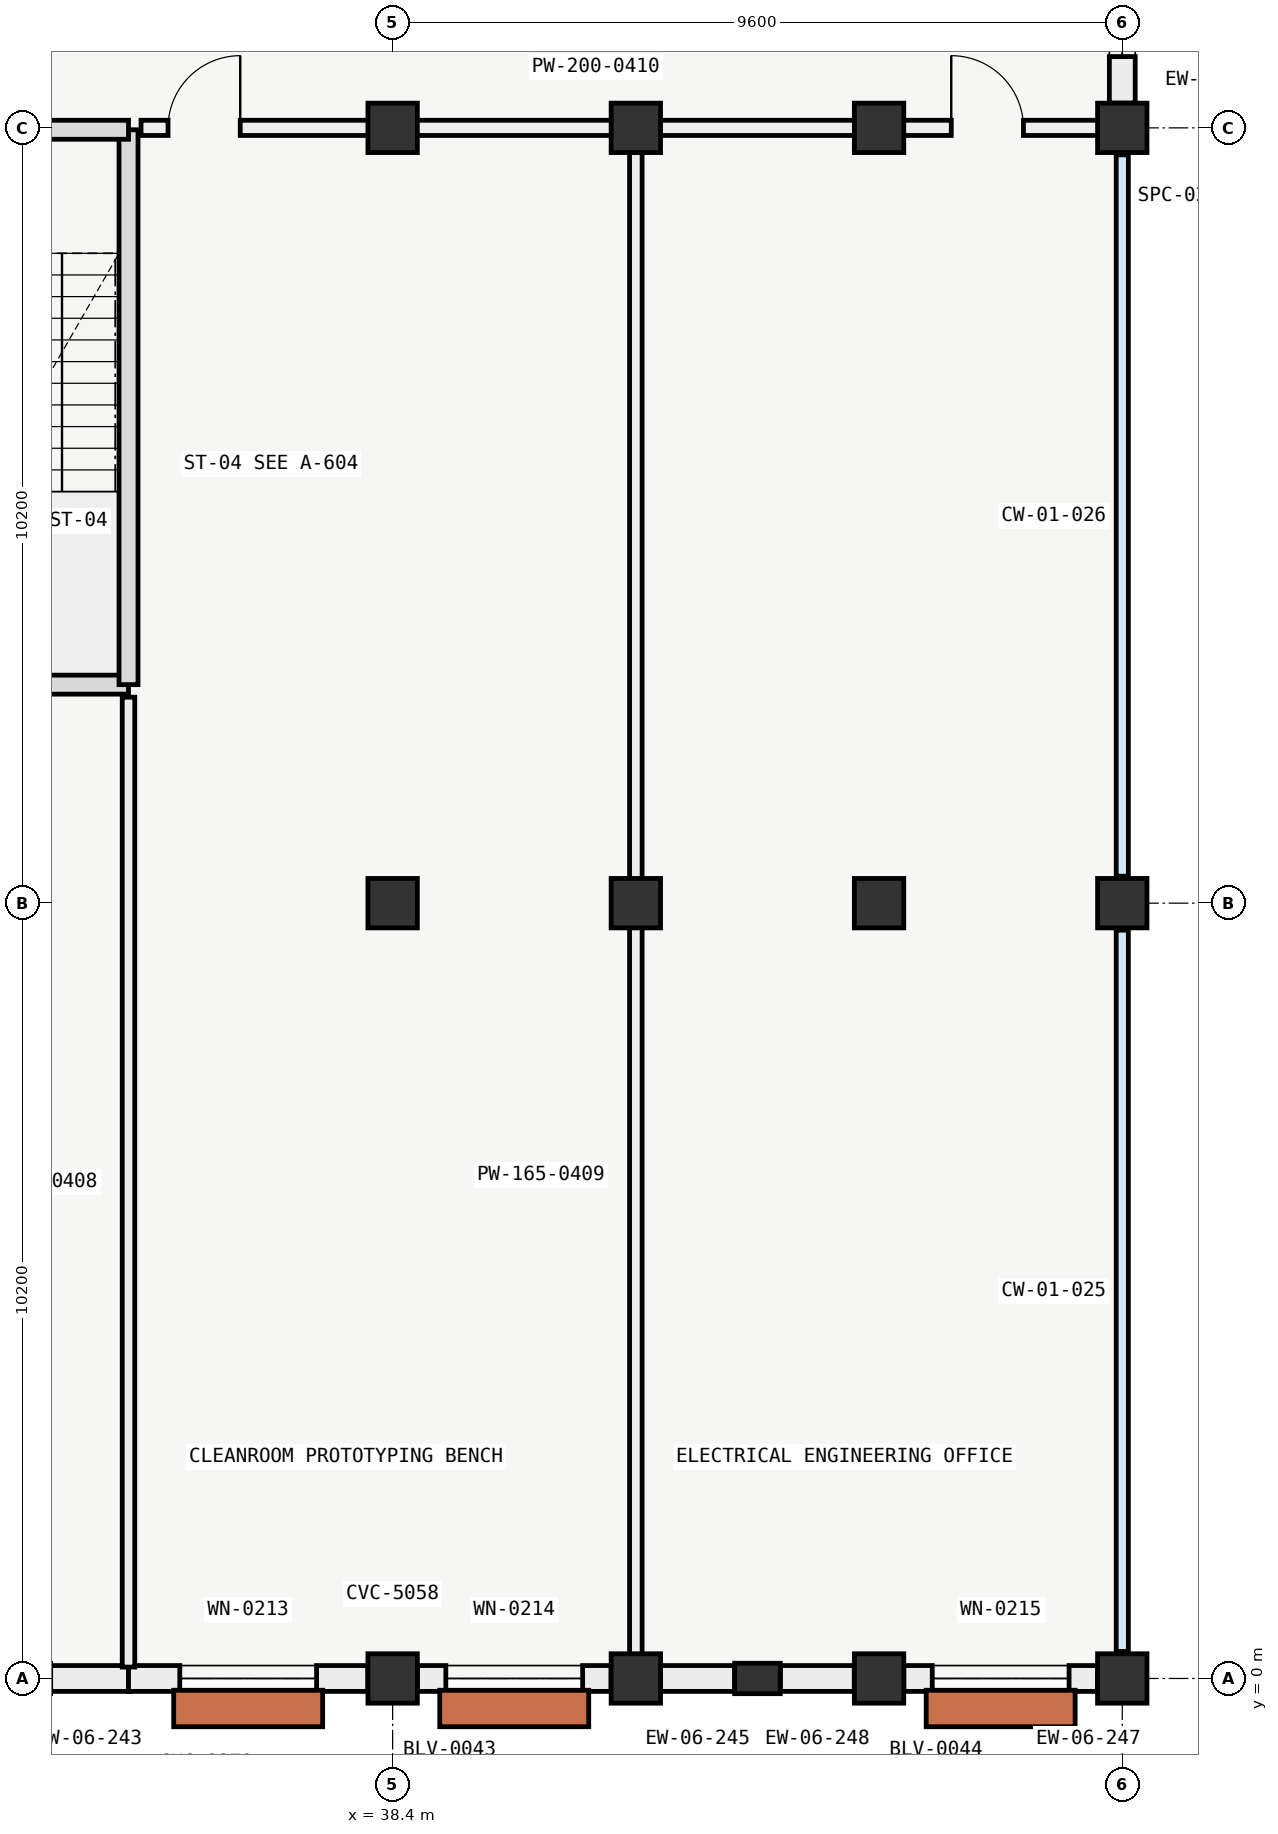
"""IFC4 building model, lengths in metres.
Left out: names, types, materials, properties, quantities, classifications, styles, units other than length and angle.
Written with IfcOpenShell. Run it as: python <this file> out.ifc"""

import sys

from ifc_helpers import new_model, si_unit, direction, frame, frame_2d, origin, origin_2d, place, context, subcontext, project, spatial, rectangle, extrude, element, fill, save


model = new_model("IFC4")
c1 = context("Model", 3, precision=1e-05, world=origin(), true_north=direction((0.0, 1.0)))
c2 = subcontext(c1, "Body", "Model", "MODEL_VIEW")
j1 = project(units=[si_unit("LENGTHUNIT", "METRE"), si_unit("PLANEANGLEUNIT", "RADIAN")], contexts=[c1])
p1 = place(None, origin())
s1 = spatial("IfcSite", under=j1, at=p1, CompositionType="ELEMENT")
p2 = place(p1, origin())
s2 = spatial("IfcBuilding", under=s1, at=p2, CompositionType="ELEMENT")
p3 = place(p2, frame((0.0, 0.0, 13.8)))
s3 = spatial("IfcBuildingStorey", under=s2, at=p3, CompositionType="ELEMENT", Elevation=13.8)
for number, where, z_axis, x_axis in (
    (1, (38.4, 0.0, 0.0), (0.0, 0.0, 1.0), (1.0, 0.0, 0.0)),
    (2, (38.4, 10.2, 0.0), (0.0, 0.0, 1.0), (1.0, 0.0, 0.0)),
    (3, (38.4, 20.4, 0.0), (0.0, 0.0, 1.0), (1.0, 0.0, 0.0)),
    (4, (41.6, 0.0, 0.0), (0.0, 0.0, 1.0), (1.0, 0.0, 0.0)),
    (5, (41.6, 10.2, 0.0), (0.0, 0.0, 1.0), (1.0, 0.0, 0.0)),
    (6, (41.6, 20.4, 0.0), (0.0, 0.0, 1.0), (1.0, 0.0, 0.0)),
    (7, (44.8, 0.0, 0.0), (0.0, 0.0, 1.0), (1.0, 0.0, 0.0)),
    (8, (44.8, 10.2, 0.0), (0.0, 0.0, 1.0), (1.0, 0.0, 0.0)),
    (9, (44.8, 20.4, 0.0), (0.0, 0.0, 1.0), (1.0, 0.0, 0.0)),
    (10, (48.0, 0.0, 0.0), (0.0, 0.0, 1.0), (1.0, 0.0, 0.0)),
    (11, (48.0, 10.2, 0.0), (0.0, 0.0, 1.0), (1.0, 0.0, 0.0)),
    (12, (48.0, 20.4, 0.0), (0.0, 0.0, 1.0), (1.0, 0.0, 0.0)),
):
    element("IfcColumn", number, at=place(p3, frame(where, z_axis=z_axis, x_axis=x_axis)), inside=s3, PredefinedType="COLUMN", context=c2, shape_type="SweptSolid", body=[
        extrude(rectangle(XDim=0.65, YDim=0.65, at=origin_2d()), origin(), (0.0, 0.0, 1.0), 4.2),
    ])
p4 = place(p3, frame((43.2, 0.0, 0.0), z_axis=(0.0, 0.0, 1.0), x_axis=(0.0, 1.0, 0.0)))
e13 = element("IfcColumn", 13, at=p4, inside=s3, PredefinedType="PILASTER", context=c2, shape_type="SweptSolid", body=[
    extrude(rectangle(XDim=0.4, YDim=0.6, at=origin_2d()), origin(), (0.0, 0.0, 1.0), 4.2),
])
p5 = place(p3, frame((34.925, 0.0, 0.0), z_axis=(0.0, 0.0, 1.0), x_axis=(-1.0, 0.0, 0.0)))
e14 = element("IfcWall", 14, at=p5, inside=s3, PredefinedType="SOLIDWALL", context=c2, shape_type="SweptSolid", body=[
    extrude(rectangle(XDim=1.024, YDim=0.34, at=frame_2d((0.512, 0.0))), origin(), (0.0, 0.0, 1.0), 3.28),
])
p6 = place(p3, frame((38.074, 0.0, 0.0), z_axis=(0.0, 0.0, 1.0), x_axis=(-1.0, 0.0, 0.0)))
e15 = element("IfcWall", 15, at=p6, inside=s3, PredefinedType="SOLIDWALL", context=c2, shape_type="SweptSolid", body=[
    extrude(rectangle(XDim=3.149, YDim=0.34, at=frame_2d((1.574, 0.0))), origin(), (0.0, 0.0, 1.0), 3.28),
])
p7 = place(p6, frame((0.675, 0.0, 0.8)))
e16 = element("IfcOpeningElement", 16, at=p7, cuts=e15, PredefinedType="OPENING", context=c2, shape_type="SweptSolid", body=[
    extrude(rectangle(XDim=1.8, YDim=2.1, at=frame_2d((0.9, 1.05))), frame((0.0, 0.18, 0.0), z_axis=(0.0, -1.0, 0.0), x_axis=(1.0, 0.0, 0.0)), (0.0, 0.0, 1.0), 0.36),
])
p8 = place(p3, frame((42.899, 0.0, 0.0), z_axis=(0.0, 0.0, 1.0), x_axis=(-1.0, 0.0, 0.0)))
e17 = element("IfcWall", 17, at=p8, inside=s3, PredefinedType="SOLIDWALL", context=c2, shape_type="SweptSolid", body=[
    extrude(rectangle(XDim=0.973, YDim=0.34, at=frame_2d((0.486, 0.0))), origin(), (0.0, 0.0, 1.0), 3.28),
])
p9 = place(p3, frame((41.274, 0.0, 0.0), z_axis=(0.0, 0.0, 1.0), x_axis=(-1.0, 0.0, 0.0)))
e18 = element("IfcWall", 18, at=p9, inside=s3, PredefinedType="SOLIDWALL", context=c2, shape_type="SweptSolid", body=[
    extrude(rectangle(XDim=2.548, YDim=0.34, at=frame_2d((1.274, 0.0))), origin(), (0.0, 0.0, 1.0), 3.28),
])
p10 = place(p9, frame((0.374, 0.0, 0.8)))
e19 = element("IfcOpeningElement", 19, at=p10, cuts=e18, PredefinedType="OPENING", context=c2, shape_type="SweptSolid", body=[
    extrude(rectangle(XDim=1.8, YDim=2.1, at=frame_2d((0.9, 1.05))), frame((0.0, 0.18, 0.0), z_axis=(0.0, -1.0, 0.0), x_axis=(1.0, 0.0, 0.0)), (0.0, 0.0, 1.0), 0.36),
])
p11 = place(p3, frame((47.674, 0.0, 0.0), z_axis=(0.0, 0.0, 1.0), x_axis=(-1.0, 0.0, 0.0)))
e20 = element("IfcWall", 20, at=p11, inside=s3, PredefinedType="SOLIDWALL", context=c2, shape_type="SweptSolid", body=[
    extrude(rectangle(XDim=2.548, YDim=0.34, at=frame_2d((1.274, 0.0))), origin(), (0.0, 0.0, 1.0), 3.28),
])
p12 = place(p11, frame((0.374, 0.0, 0.8)))
e21 = element("IfcOpeningElement", 21, at=p12, cuts=e20, PredefinedType="OPENING", context=c2, shape_type="SweptSolid", body=[
    extrude(rectangle(XDim=1.8, YDim=2.1, at=frame_2d((0.9, 1.05))), frame((0.0, 0.18, 0.0), z_axis=(0.0, -1.0, 0.0), x_axis=(1.0, 0.0, 0.0)), (0.0, 0.0, 1.0), 0.36),
])
p13 = place(p3, frame((44.474, 0.0, 0.0), z_axis=(0.0, 0.0, 1.0), x_axis=(-1.0, 0.0, 0.0)))
e22 = element("IfcWall", 22, at=p13, inside=s3, PredefinedType="SOLIDWALL", context=c2, shape_type="SweptSolid", body=[
    extrude(rectangle(XDim=0.973, YDim=0.34, at=frame_2d((0.487, 0.0))), origin(), (0.0, 0.0, 1.0), 3.28),
])
p14 = place(p3, frame((48.0, 23.95, 0.0), z_axis=(0.0, 0.0, 1.0), x_axis=(0.0, -1.0, 0.0)))
e23 = element("IfcWall", 23, at=p14, inside=s3, PredefinedType="SOLIDWALL", context=c2, shape_type="SweptSolid", body=[
    extrude(rectangle(XDim=3.224, YDim=0.34, at=frame_2d((1.612, 0.0))), origin(), (0.0, 0.0, 1.0), 3.28),
])
p15 = place(p14, frame((0.612, 0.0, 0.75)))
e24 = element("IfcOpeningElement", 24, at=p15, cuts=e23, PredefinedType="OPENING", context=c2, shape_type="SweptSolid", body=[
    extrude(rectangle(XDim=2.0, YDim=1.35, at=frame_2d((1.0, 0.675))), frame((0.0, 0.18, 0.0), z_axis=(0.0, -1.0, 0.0), x_axis=(1.0, 0.0, 0.0)), (0.0, 0.0, 1.0), 0.36),
])
p16 = place(p3, frame((31.475, 13.075, 0.0), z_axis=(0.0, 0.0, 1.0), x_axis=(1.0, 0.0, 0.0)))
e25 = element("IfcWall", 25, at=p16, inside=s3, PredefinedType="SOLIDWALL", context=c2, shape_type="SweptSolid", body=[
    extrude(rectangle(XDim=3.45, YDim=0.25, at=frame_2d((1.725, 0.0))), origin(), (0.0, 0.0, 1.0), 3.95),
])
p17 = place(p3, frame((34.925, 13.075, 0.0), z_axis=(0.0, 0.0, 1.0), x_axis=(0.0, 1.0, 0.0)))
e26 = element("IfcWall", 26, at=p17, inside=s3, PredefinedType="SOLIDWALL", context=c2, shape_type="SweptSolid", body=[
    extrude(rectangle(XDim=7.3, YDim=0.25, at=frame_2d((3.65, 0.0))), origin(), (0.0, 0.0, 1.0), 3.95),
])
p18 = place(p3, frame((34.925, 20.375, 0.0), z_axis=(0.0, 0.0, 1.0), x_axis=(-1.0, 0.0, 0.0)))
e27 = element("IfcWall", 27, at=p18, inside=s3, PredefinedType="SOLIDWALL", context=c2, shape_type="SweptSolid", body=[
    extrude(rectangle(XDim=3.45, YDim=0.25, at=frame_2d((1.725, 0.0))), origin(), (0.0, 0.0, 1.0), 3.95),
])
p19 = place(p18, frame((1.175, 0.0, 0.0)))
e28 = element("IfcOpeningElement", 28, at=p19, cuts=e27, PredefinedType="OPENING", context=c2, shape_type="SweptSolid", body=[
    extrude(rectangle(XDim=1.1, YDim=2.2, at=frame_2d((0.55, 1.1))), frame((0.0, 0.135, 0.0), z_axis=(0.0, -1.0, 0.0), x_axis=(1.0, 0.0, 0.0)), (0.0, 0.0, 1.0), 0.27),
])
p20 = place(p3, frame((34.925, 0.15, 0.0), z_axis=(0.0, 0.0, 1.0), x_axis=(0.0, 1.0, 0.0)))
e29 = element("IfcWall", 29, at=p20, inside=s3, PredefinedType="PARTITIONING", context=c2, shape_type="SweptSolid", body=[
    extrude(rectangle(XDim=12.76, YDim=0.165, at=frame_2d((6.38, 0.0))), origin(), (0.0, 0.0, 1.0), 3.33),
])
p21 = place(p3, frame((41.6, 0.15, 0.0), z_axis=(0.0, 0.0, 1.0), x_axis=(0.0, 1.0, 0.0)))
e30 = element("IfcWall", 30, at=p21, inside=s3, PredefinedType="PARTITIONING", context=c2, shape_type="SweptSolid", body=[
    extrude(rectangle(XDim=20.25, YDim=0.165, at=frame_2d((10.125, 0.0))), origin(), (0.0, 0.0, 1.0), 3.33),
])
p22 = place(p3, frame((35.09, 20.4, 0.0), z_axis=(0.0, 0.0, 1.0), x_axis=(1.0, 0.0, 0.0)))
e31 = element("IfcWall", 31, at=p22, inside=s3, PredefinedType="PARTITIONING", context=c2, shape_type="SweptSolid", body=[
    extrude(rectangle(XDim=12.76, YDim=0.2, at=frame_2d((6.38, 0.0))), origin(), (0.0, 0.0, 1.0), 3.28),
])
p23 = place(p22, frame((0.355, 0.0, 0.0)))
e32 = element("IfcOpeningElement", 32, at=p23, cuts=e31, PredefinedType="OPENING", context=c2, shape_type="SweptSolid", body=[
    extrude(rectangle(XDim=0.95, YDim=2.1, at=frame_2d((0.475, 1.05))), frame((0.0, 0.11, 0.0), z_axis=(0.0, -1.0, 0.0), x_axis=(1.0, 0.0, 0.0)), (0.0, 0.0, 1.0), 0.22),
])
p24 = place(p22, frame((10.66, 0.0, 0.0)))
e33 = element("IfcOpeningElement", 33, at=p24, cuts=e31, PredefinedType="OPENING", context=c2, shape_type="SweptSolid", body=[
    extrude(rectangle(XDim=0.95, YDim=2.1, at=frame_2d((0.475, 1.05))), frame((0.0, 0.11, 0.0), z_axis=(0.0, -1.0, 0.0), x_axis=(1.0, 0.0, 0.0)), (0.0, 0.0, 1.0), 0.22),
])
p25 = place(p7, origin())
e34 = element("IfcWindow", 34, at=p25, inside=s3, PartitioningType="SINGLE_PANEL", PredefinedType="WINDOW", context=c2, shape_type="SweptSolid", body=[
    extrude(rectangle(XDim=1.8, YDim=2.1, at=frame_2d((0.9, 1.05))), frame((0.0, 0.03, 0.0), z_axis=(0.0, -1.0, 0.0), x_axis=(1.0, 0.0, 0.0)), (0.0, 0.0, 1.0), 0.06),
])
fill(e16, e34)
p26 = place(p10, origin())
e35 = element("IfcWindow", 35, at=p26, inside=s3, PartitioningType="SINGLE_PANEL", PredefinedType="WINDOW", context=c2, shape_type="SweptSolid", body=[
    extrude(rectangle(XDim=1.8, YDim=2.1, at=frame_2d((0.9, 1.05))), frame((0.0, 0.03, 0.0), z_axis=(0.0, -1.0, 0.0), x_axis=(1.0, 0.0, 0.0)), (0.0, 0.0, 1.0), 0.06),
])
fill(e19, e35)
p27 = place(p12, origin())
e36 = element("IfcWindow", 36, at=p27, inside=s3, PartitioningType="SINGLE_PANEL", PredefinedType="WINDOW", context=c2, shape_type="SweptSolid", body=[
    extrude(rectangle(XDim=1.8, YDim=2.1, at=frame_2d((0.9, 1.05))), frame((0.0, 0.03, 0.0), z_axis=(0.0, -1.0, 0.0), x_axis=(1.0, 0.0, 0.0)), (0.0, 0.0, 1.0), 0.06),
])
fill(e21, e36)
p28 = place(p15, origin())
e37 = element("IfcWindow", 37, at=p28, inside=s3, PartitioningType="SINGLE_PANEL", PredefinedType="WINDOW", context=c2, shape_type="SweptSolid", body=[
    extrude(rectangle(XDim=2.0, YDim=1.35, at=frame_2d((1.0, 0.675))), frame((0.0, 0.03, 0.0), z_axis=(0.0, -1.0, 0.0), x_axis=(1.0, 0.0, 0.0)), (0.0, 0.0, 1.0), 0.06),
])
fill(e24, e37)
p29 = place(p23, origin())
e38 = element("IfcDoor", 38, at=p29, inside=s3, OperationType="SINGLE_SWING_RIGHT", PredefinedType="DOOR", context=c2, shape_type="SweptSolid", body=[
    extrude(rectangle(XDim=0.95, YDim=2.1, at=frame_2d((0.475, 1.05))), frame((0.0, 0.025, 0.0), z_axis=(0.0, -1.0, 0.0), x_axis=(1.0, 0.0, 0.0)), (0.0, 0.0, 1.0), 0.05),
])
fill(e32, e38)
p30 = place(p24, origin())
e39 = element("IfcDoor", 39, at=p30, inside=s3, OperationType="SINGLE_SWING_LEFT", PredefinedType="DOOR", context=c2, shape_type="SweptSolid", body=[
    extrude(rectangle(XDim=0.95, YDim=2.1, at=frame_2d((0.475, 1.05))), frame((0.0, 0.025, 0.0), z_axis=(0.0, -1.0, 0.0), x_axis=(1.0, 0.0, 0.0)), (0.0, 0.0, 1.0), 0.05),
])
fill(e33, e39)
save(model, sys.argv[1])
